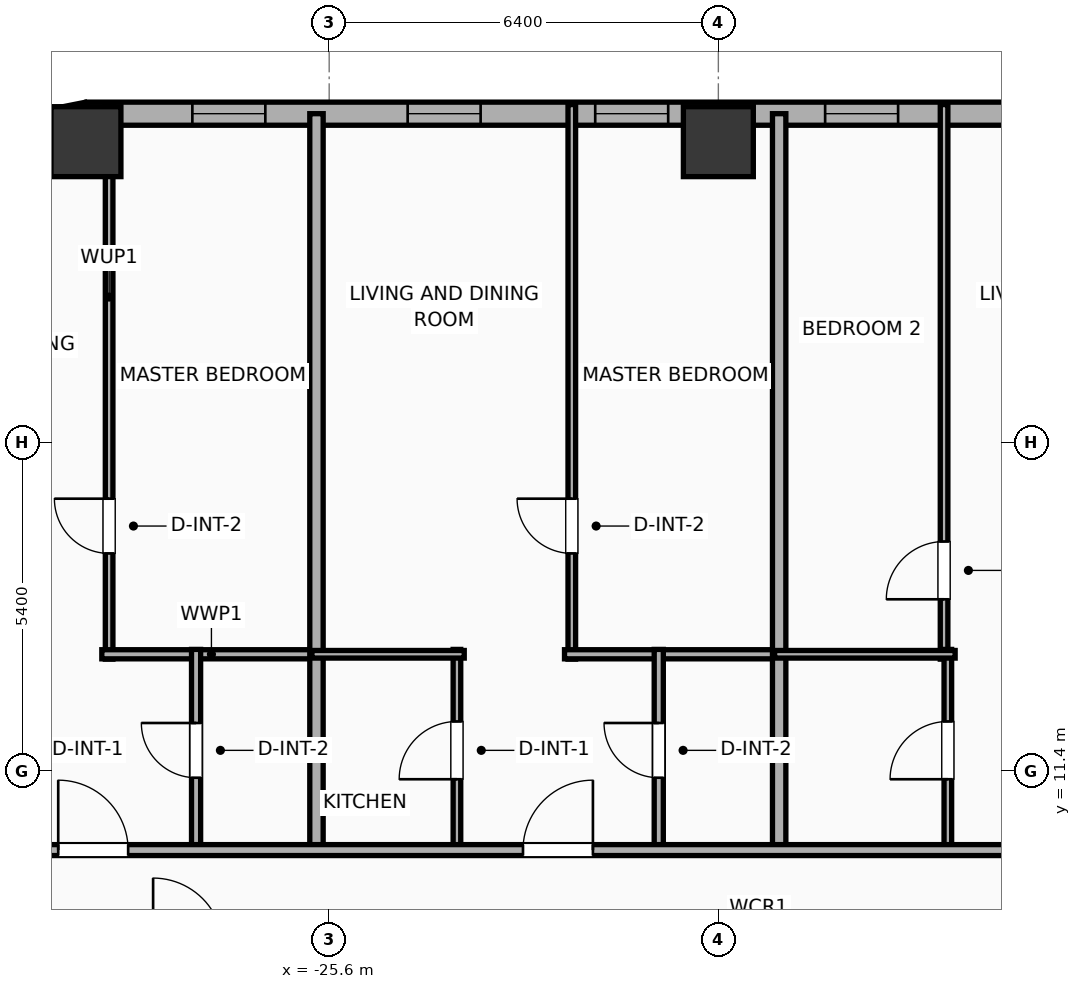
"""IFC4 building model, lengths in metres.
Left out: names, types, materials, properties, quantities, classifications, styles, units other than length and angle.
Written with IfcOpenShell. Run it as: python <this file> out.ifc"""

import sys

from ifc_helpers import new_model, si_unit, direction, frame, frame_2d, origin, origin_2d, place, context, subcontext, project, spatial, rectangle, hollow_rectangle, extrude, element, fill, save


model = new_model("IFC4")
c1 = context("Model", 3, precision=1e-05, world=origin(), true_north=direction((0.0, 1.0)))
c2 = subcontext(c1, "Body", "Model", "MODEL_VIEW")
j1 = project(units=[si_unit("LENGTHUNIT", "METRE"), si_unit("PLANEANGLEUNIT", "RADIAN")], contexts=[c1])
p1 = place(None, origin())
s1 = spatial("IfcSite", under=j1, at=p1, CompositionType="ELEMENT")
p2 = place(p1, origin())
s2 = spatial("IfcBuilding", under=s1, at=p2, CompositionType="ELEMENT")
p3 = place(p2, frame((0.0, 0.0, 45.5)))
s3 = spatial("IfcBuildingStorey", under=s2, at=p3, CompositionType="ELEMENT", Elevation=45.5)
for number, where, z_axis, x_axis in (
    (1, (-19.2, 21.75, 0.0), (0.0, 0.0, 1.0), (1.0, 0.0, 0.0)),
    (2, (-29.6, 21.75, 0.0), (0.0, 0.0, 1.0), (1.0, 0.0, 0.0)),
):
    element("IfcColumn", number, at=place(p3, frame(where, z_axis=z_axis, x_axis=x_axis)), inside=s3, PredefinedType="COLUMN", context=c2, shape_type="SweptSolid", body=[
        extrude(hollow_rectangle(XDim=1.15, YDim=1.15, WallThickness=0.04, at=origin_2d()), origin(), (0.0, 0.0, 1.0), 3.9),
    ])
p4 = place(p3, frame((-31.057, 21.917, 0.0), z_axis=(0.0, 0.0, 1.0), x_axis=(0.980786132421, 0.195086038585, 0.0)))
e3 = element("IfcWall", 3, at=p4, inside=s3, PredefinedType="ELEMENTEDWALL", context=c2, shape_type="SweptSolid", body=[
    extrude(rectangle(XDim=1.504, YDim=0.38, at=frame_2d((0.752, 0.0))), origin(), (0.0, 0.0, 1.0), 3.65),
])
p5 = place(p3, frame((-29.581, 22.21, 0.0), z_axis=(0.0, 0.0, 1.0), x_axis=(1.0, 0.0, 0.0)))
e4 = element("IfcWall", 4, at=p5, inside=s3, PredefinedType="ELEMENTEDWALL", context=c2, shape_type="SweptSolid", body=[
    extrude(rectangle(XDim=51.963, YDim=0.38, at=frame_2d((25.981, 0.0))), origin(), (0.0, 0.0, 1.0), 3.65),
])
p6 = place(p5, frame((25.631, 0.0, 0.75)))
e5 = element("IfcOpeningElement", 5, at=p6, cuts=e4, PredefinedType="OPENING", context=c2, shape_type="SweptSolid", body=[
    extrude(rectangle(XDim=2.4, YDim=2.1, at=frame_2d((1.2, 1.05))), frame((0.0, 0.2, 0.0), z_axis=(0.0, -1.0, 0.0), x_axis=(1.0, 0.0, 0.0)), (0.0, 0.0, 1.0), 0.4),
])
p7 = place(p5, frame((42.952, 0.0, 0.75)))
e6 = element("IfcOpeningElement", 6, at=p7, cuts=e4, PredefinedType="OPENING", context=c2, shape_type="SweptSolid", body=[
    extrude(rectangle(XDim=2.4, YDim=2.1, at=frame_2d((1.2, 1.05))), frame((0.0, 0.2, 0.0), z_axis=(0.0, -1.0, 0.0), x_axis=(1.0, 0.0, 0.0)), (0.0, 0.0, 1.0), 0.4),
])
p8 = place(p5, frame((1.731, 0.0, 0.75)))
e7 = element("IfcOpeningElement", 7, at=p8, cuts=e4, PredefinedType="OPENING", context=c2, shape_type="SweptSolid", body=[
    extrude(rectangle(XDim=1.2, YDim=2.05, at=frame_2d((0.6, 1.025))), frame((0.0, 0.2, 0.0), z_axis=(0.0, -1.0, 0.0), x_axis=(1.0, 0.0, 0.0)), (0.0, 0.0, 1.0), 0.4),
])
p9 = place(p5, frame((5.272, 0.0, 0.75)))
e8 = element("IfcOpeningElement", 8, at=p9, cuts=e4, PredefinedType="OPENING", context=c2, shape_type="SweptSolid", body=[
    extrude(rectangle(XDim=1.2, YDim=2.05, at=frame_2d((0.6, 1.025))), frame((0.0, 0.2, 0.0), z_axis=(0.0, -1.0, 0.0), x_axis=(1.0, 0.0, 0.0)), (0.0, 0.0, 1.0), 0.4),
])
p10 = place(p5, frame((8.356, 0.0, 0.75)))
e9 = element("IfcOpeningElement", 9, at=p10, cuts=e4, PredefinedType="OPENING", context=c2, shape_type="SweptSolid", body=[
    extrude(rectangle(XDim=1.2, YDim=2.05, at=frame_2d((0.6, 1.025))), frame((0.0, 0.2, 0.0), z_axis=(0.0, -1.0, 0.0), x_axis=(1.0, 0.0, 0.0)), (0.0, 0.0, 1.0), 0.4),
])
p11 = place(p5, frame((15.632, 0.0, 0.75)))
e10 = element("IfcOpeningElement", 10, at=p11, cuts=e4, PredefinedType="OPENING", context=c2, shape_type="SweptSolid", body=[
    extrude(rectangle(XDim=1.2, YDim=2.05, at=frame_2d((0.6, 1.025))), frame((0.0, 0.2, 0.0), z_axis=(0.0, -1.0, 0.0), x_axis=(1.0, 0.0, 0.0)), (0.0, 0.0, 1.0), 0.4),
])
p12 = place(p5, frame((12.137, 0.0, 0.75)))
e11 = element("IfcOpeningElement", 11, at=p12, cuts=e4, PredefinedType="OPENING", context=c2, shape_type="SweptSolid", body=[
    extrude(rectangle(XDim=1.2, YDim=2.05, at=frame_2d((0.6, 1.025))), frame((0.0, 0.2, 0.0), z_axis=(0.0, -1.0, 0.0), x_axis=(1.0, 0.0, 0.0)), (0.0, 0.0, 1.0), 0.4),
])
p13 = place(p5, frame((18.756, 0.0, 0.75)))
e12 = element("IfcOpeningElement", 12, at=p13, cuts=e4, PredefinedType="OPENING", context=c2, shape_type="SweptSolid", body=[
    extrude(rectangle(XDim=1.2, YDim=2.05, at=frame_2d((0.6, 1.025))), frame((0.0, 0.2, 0.0), z_axis=(0.0, -1.0, 0.0), x_axis=(1.0, 0.0, 0.0)), (0.0, 0.0, 1.0), 0.4),
])
p14 = place(p5, frame((22.907, 0.0, 0.75)))
e13 = element("IfcOpeningElement", 13, at=p14, cuts=e4, PredefinedType="OPENING", context=c2, shape_type="SweptSolid", body=[
    extrude(rectangle(XDim=1.2, YDim=2.05, at=frame_2d((0.6, 1.025))), frame((0.0, 0.2, 0.0), z_axis=(0.0, -1.0, 0.0), x_axis=(1.0, 0.0, 0.0)), (0.0, 0.0, 1.0), 0.4),
])
p15 = place(p5, frame((36.381, 0.0, 0.75)))
e14 = element("IfcOpeningElement", 14, at=p15, cuts=e4, PredefinedType="OPENING", context=c2, shape_type="SweptSolid", body=[
    extrude(rectangle(XDim=1.2, YDim=2.05, at=frame_2d((0.6, 1.025))), frame((0.0, 0.2, 0.0), z_axis=(0.0, -1.0, 0.0), x_axis=(1.0, 0.0, 0.0)), (0.0, 0.0, 1.0), 0.4),
])
p16 = place(p5, frame((32.886, 0.0, 0.75)))
e15 = element("IfcOpeningElement", 15, at=p16, cuts=e4, PredefinedType="OPENING", context=c2, shape_type="SweptSolid", body=[
    extrude(rectangle(XDim=1.2, YDim=2.05, at=frame_2d((0.6, 1.025))), frame((0.0, 0.2, 0.0), z_axis=(0.0, -1.0, 0.0), x_axis=(1.0, 0.0, 0.0)), (0.0, 0.0, 1.0), 0.4),
])
p17 = place(p5, frame((39.556, 0.0, 0.75)))
e16 = element("IfcOpeningElement", 16, at=p17, cuts=e4, PredefinedType="OPENING", context=c2, shape_type="SweptSolid", body=[
    extrude(rectangle(XDim=1.2, YDim=2.05, at=frame_2d((0.6, 1.025))), frame((0.0, 0.2, 0.0), z_axis=(0.0, -1.0, 0.0), x_axis=(1.0, 0.0, 0.0)), (0.0, 0.0, 1.0), 0.4),
])
p18 = place(p5, frame((46.885, 0.0, 0.75)))
e17 = element("IfcOpeningElement", 17, at=p18, cuts=e4, PredefinedType="OPENING", context=c2, shape_type="SweptSolid", body=[
    extrude(rectangle(XDim=1.2, YDim=2.05, at=frame_2d((0.6, 1.025))), frame((0.0, 0.2, 0.0), z_axis=(0.0, -1.0, 0.0), x_axis=(1.0, 0.0, 0.0)), (0.0, 0.0, 1.0), 0.4),
])
p19 = place(p5, frame((49.531, 0.0, 0.75)))
e18 = element("IfcOpeningElement", 18, at=p19, cuts=e4, PredefinedType="OPENING", context=c2, shape_type="SweptSolid", body=[
    extrude(rectangle(XDim=1.2, YDim=2.05, at=frame_2d((0.6, 1.025))), frame((0.0, 0.2, 0.0), z_axis=(0.0, -1.0, 0.0), x_axis=(1.0, 0.0, 0.0)), (0.0, 0.0, 1.0), 0.4),
])
p20 = place(p3, frame((-29.219, 13.24, 0.0), z_axis=(0.0, 0.0, 1.0), x_axis=(0.0, 1.0, 0.0)))
e19 = element("IfcWall", 19, at=p20, inside=s3, PredefinedType="PARTITIONING", context=c2, shape_type="SweptSolid", body=[
    extrude(rectangle(XDim=9.12, YDim=0.125, at=frame_2d((4.56, 0.0))), origin(), (0.0, 0.0, 1.0), 3.65),
])
p21 = place(p20, frame((1.739, 0.0, 0.0)))
e20 = element("IfcOpeningElement", 20, at=p21, cuts=e19, PredefinedType="OPENING", context=c2, shape_type="SweptSolid", body=[
    extrude(rectangle(XDim=0.9, YDim=2.05, at=frame_2d((0.45, 1.025))), frame((0.0, 0.073, 0.0), z_axis=(0.0, -1.0, 0.0), x_axis=(1.0, 0.0, 0.0)), (0.0, 0.0, 1.0), 0.145),
])
p22 = place(p3, frame((-29.339, 13.32, 0.0), z_axis=(0.0, 0.0, 1.0), x_axis=(1.0, 0.0, 0.0)))
e21 = element("IfcWall", 21, at=p22, inside=s3, PredefinedType="PLUMBINGWALL", context=c2, shape_type="SweptSolid", body=[
    extrude(rectangle(XDim=3.605, YDim=0.15, at=frame_2d((1.803, 0.0))), origin(), (0.0, 0.0, 1.0), 3.65),
])
p23 = place(p3, frame((-27.789, 10.08, 0.0), z_axis=(0.0, 0.0, 1.0), x_axis=(0.0, 1.0, 0.0)))
e22 = element("IfcWall", 22, at=p23, inside=s3, PredefinedType="PLUMBINGWALL", context=c2, shape_type="SweptSolid", body=[
    extrude(rectangle(XDim=3.32, YDim=0.15, at=frame_2d((1.66, 0.0))), origin(), (0.0, 0.0, 1.0), 3.65),
])
p24 = place(p23, frame((1.21, 0.0, 0.0)))
e23 = element("IfcOpeningElement", 23, at=p24, cuts=e22, PredefinedType="OPENING", context=c2, shape_type="SweptSolid", body=[
    extrude(rectangle(XDim=0.9, YDim=2.05, at=frame_2d((0.45, 1.025))), frame((0.0, 0.085, 0.0), z_axis=(0.0, -1.0, 0.0), x_axis=(1.0, 0.0, 0.0)), (0.0, 0.0, 1.0), 0.17),
])
p25 = place(p3, frame((-25.809, 10.02, 0.0), z_axis=(0.0, 0.0, 1.0), x_axis=(0.0, 1.0, 0.0)))
e24 = element("IfcWall", 24, at=p25, inside=s3, PredefinedType="PARTITIONING", context=c2, shape_type="SweptSolid", body=[
    extrude(rectangle(XDim=12.19, YDim=0.22, at=frame_2d((6.095, 0.0))), origin(), (0.0, 0.0, 1.0), 3.65),
])
p26 = place(p3, frame((-21.61, 13.24, 0.0), z_axis=(0.0, 0.0, 1.0), x_axis=(0.0, 1.0, 0.0)))
e25 = element("IfcWall", 25, at=p26, inside=s3, PredefinedType="PARTITIONING", context=c2, shape_type="SweptSolid", body=[
    extrude(rectangle(XDim=9.12, YDim=0.125, at=frame_2d((4.56, 0.0))), origin(), (0.0, 0.0, 1.0), 3.65),
])
p27 = place(p26, frame((1.739, 0.0, 0.0)))
e26 = element("IfcOpeningElement", 26, at=p27, cuts=e25, PredefinedType="OPENING", context=c2, shape_type="SweptSolid", body=[
    extrude(rectangle(XDim=0.9, YDim=2.05, at=frame_2d((0.45, 1.025))), frame((0.0, 0.073, 0.0), z_axis=(0.0, -1.0, 0.0), x_axis=(1.0, 0.0, 0.0)), (0.0, 0.0, 1.0), 0.145),
])
p28 = place(p3, frame((-21.73, 13.32, 0.0), z_axis=(0.0, 0.0, 1.0), x_axis=(1.0, 0.0, 0.0)))
e27 = element("IfcWall", 27, at=p28, inside=s3, PredefinedType="PLUMBINGWALL", context=c2, shape_type="SweptSolid", body=[
    extrude(rectangle(XDim=3.605, YDim=0.15, at=frame_2d((1.802, 0.0))), origin(), (0.0, 0.0, 1.0), 3.65),
])
p29 = place(p3, frame((-23.499, 10.08, 0.0), z_axis=(0.0, 0.0, 1.0), x_axis=(0.0, 1.0, 0.0)))
e28 = element("IfcWall", 28, at=p29, inside=s3, PredefinedType="PARTITIONING", context=c2, shape_type="SweptSolid", body=[
    extrude(rectangle(XDim=3.32, YDim=0.125, at=frame_2d((1.66, 0.0))), origin(), (0.0, 0.0, 1.0), 3.65),
])
p30 = place(p29, frame((1.185, 0.0, 0.0)))
e29 = element("IfcOpeningElement", 29, at=p30, cuts=e28, PredefinedType="OPENING", context=c2, shape_type="SweptSolid", body=[
    extrude(rectangle(XDim=0.95, YDim=2.05, at=frame_2d((0.475, 1.025))), frame((0.0, 0.073, 0.0), z_axis=(0.0, -1.0, 0.0), x_axis=(1.0, 0.0, 0.0)), (0.0, 0.0, 1.0), 0.145),
])
p31 = place(p3, frame((-25.884, 13.32, 0.0), z_axis=(0.0, 0.0, 1.0), x_axis=(1.0, 0.0, 0.0)))
e30 = element("IfcWall", 30, at=p31, inside=s3, PredefinedType="PARTITIONING", context=c2, shape_type="SweptSolid", body=[
    extrude(rectangle(XDim=2.505, YDim=0.125, at=frame_2d((1.252, 0.0))), origin(), (0.0, 0.0, 1.0), 3.65),
])
p32 = place(p3, frame((-20.18, 10.08, 0.0), z_axis=(0.0, 0.0, 1.0), x_axis=(0.0, 1.0, 0.0)))
e31 = element("IfcWall", 31, at=p32, inside=s3, PredefinedType="PLUMBINGWALL", context=c2, shape_type="SweptSolid", body=[
    extrude(rectangle(XDim=3.32, YDim=0.15, at=frame_2d((1.66, 0.0))), origin(), (0.0, 0.0, 1.0), 3.65),
])
p33 = place(p32, frame((1.21, 0.0, 0.0)))
e32 = element("IfcOpeningElement", 32, at=p33, cuts=e31, PredefinedType="OPENING", context=c2, shape_type="SweptSolid", body=[
    extrude(rectangle(XDim=0.9, YDim=2.05, at=frame_2d((0.45, 1.025))), frame((0.0, 0.085, 0.0), z_axis=(0.0, -1.0, 0.0), x_axis=(1.0, 0.0, 0.0)), (0.0, 0.0, 1.0), 0.17),
])
p34 = place(p3, frame((-18.2, 10.02, 0.0), z_axis=(0.0, 0.0, 1.0), x_axis=(0.0, 1.0, 0.0)))
e33 = element("IfcWall", 33, at=p34, inside=s3, PredefinedType="PARTITIONING", context=c2, shape_type="SweptSolid", body=[
    extrude(rectangle(XDim=12.19, YDim=0.22, at=frame_2d((6.095, 0.0))), origin(), (0.0, 0.0, 1.0), 3.65),
])
p35 = place(p3, frame((-15.488, 13.24, 0.0), z_axis=(0.0, 0.0, 1.0), x_axis=(0.0, 1.0, 0.0)))
e34 = element("IfcWall", 34, at=p35, inside=s3, PredefinedType="PARTITIONING", context=c2, shape_type="SweptSolid", body=[
    extrude(rectangle(XDim=9.12, YDim=0.125, at=frame_2d((4.56, 0.0))), origin(), (0.0, 0.0, 1.0), 3.65),
])
p36 = place(p35, frame((0.984, 0.0, 0.0)))
e35 = element("IfcOpeningElement", 35, at=p36, cuts=e34, PredefinedType="OPENING", context=c2, shape_type="SweptSolid", body=[
    extrude(rectangle(XDim=0.95, YDim=2.05, at=frame_2d((0.475, 1.025))), frame((0.0, 0.073, 0.0), z_axis=(0.0, -1.0, 0.0), x_axis=(1.0, 0.0, 0.0)), (0.0, 0.0, 1.0), 0.145),
])
p37 = place(p3, frame((-15.426, 10.08, 0.0), z_axis=(0.0, 0.0, 1.0), x_axis=(0.0, 1.0, 0.0)))
e36 = element("IfcWall", 36, at=p37, inside=s3, PredefinedType="PARTITIONING", context=c2, shape_type="SweptSolid", body=[
    extrude(rectangle(XDim=3.32, YDim=0.125, at=frame_2d((1.66, 0.0))), origin(), (0.0, 0.0, 1.0), 3.65),
])
p38 = place(p37, frame((1.185, 0.0, 0.0)))
e37 = element("IfcOpeningElement", 37, at=p38, cuts=e36, PredefinedType="OPENING", context=c2, shape_type="SweptSolid", body=[
    extrude(rectangle(XDim=0.95, YDim=2.05, at=frame_2d((0.475, 1.025))), frame((0.0, 0.073, 0.0), z_axis=(0.0, -1.0, 0.0), x_axis=(1.0, 0.0, 0.0)), (0.0, 0.0, 1.0), 0.145),
])
p39 = place(p3, frame((-18.275, 13.32, 0.0), z_axis=(0.0, 0.0, 1.0), x_axis=(1.0, 0.0, 0.0)))
e38 = element("IfcWall", 38, at=p39, inside=s3, PredefinedType="PARTITIONING", context=c2, shape_type="SweptSolid", body=[
    extrude(rectangle(XDim=2.969, YDim=0.125, at=frame_2d((1.484, 0.0))), origin(), (0.0, 0.0, 1.0), 3.65),
])
p40 = place(p3, frame((-33.41, 10.1, 0.0), z_axis=(0.0, 0.0, 1.0), x_axis=(1.0, 0.0, 0.0)))
e39 = element("IfcWall", 39, at=p40, inside=s3, PredefinedType="PARTITIONING", context=c2, shape_type="SweptSolid", body=[
    extrude(rectangle(XDim=59.62, YDim=0.18, at=frame_2d((29.81, 0.0))), origin(), (0.0, 0.0, 1.0), 3.65),
])
p41 = place(p40, frame((3.354, 0.0, 0.0)))
e40 = element("IfcOpeningElement", 40, at=p41, cuts=e39, PredefinedType="OPENING", context=c2, shape_type="SweptSolid", body=[
    extrude(rectangle(XDim=1.15, YDim=2.05, at=frame_2d((0.575, 1.025))), frame((0.0, 0.1, 0.0), z_axis=(0.0, -1.0, 0.0), x_axis=(1.0, 0.0, 0.0)), (0.0, 0.0, 1.0), 0.2),
])
p42 = place(p40, frame((10.997, 0.0, 0.0)))
e41 = element("IfcOpeningElement", 41, at=p42, cuts=e39, PredefinedType="OPENING", context=c2, shape_type="SweptSolid", body=[
    extrude(rectangle(XDim=1.15, YDim=2.05, at=frame_2d((0.575, 1.025))), frame((0.0, 0.1, 0.0), z_axis=(0.0, -1.0, 0.0), x_axis=(1.0, 0.0, 0.0)), (0.0, 0.0, 1.0), 0.2),
])
p43 = place(p40, frame((20.232, 0.0, 0.0)))
e42 = element("IfcOpeningElement", 42, at=p43, cuts=e39, PredefinedType="OPENING", context=c2, shape_type="SweptSolid", body=[
    extrude(rectangle(XDim=1.15, YDim=2.05, at=frame_2d((0.575, 1.025))), frame((0.0, 0.1, 0.0), z_axis=(0.0, -1.0, 0.0), x_axis=(1.0, 0.0, 0.0)), (0.0, 0.0, 1.0), 0.2),
])
p44 = place(p40, frame((30.38, 0.0, 0.0)))
e43 = element("IfcOpeningElement", 43, at=p44, cuts=e39, PredefinedType="OPENING", context=c2, shape_type="SweptSolid", body=[
    extrude(rectangle(XDim=1.15, YDim=2.05, at=frame_2d((0.575, 1.025))), frame((0.0, 0.1, 0.0), z_axis=(0.0, -1.0, 0.0), x_axis=(1.0, 0.0, 0.0)), (0.0, 0.0, 1.0), 0.2),
])
p45 = place(p40, frame((40.998, 0.0, 0.0)))
e44 = element("IfcOpeningElement", 44, at=p45, cuts=e39, PredefinedType="OPENING", context=c2, shape_type="SweptSolid", body=[
    extrude(rectangle(XDim=1.15, YDim=2.05, at=frame_2d((0.575, 1.025))), frame((0.0, 0.1, 0.0), z_axis=(0.0, -1.0, 0.0), x_axis=(1.0, 0.0, 0.0)), (0.0, 0.0, 1.0), 0.2),
])
p46 = place(p40, frame((49.428, 0.0, 0.0)))
e45 = element("IfcOpeningElement", 45, at=p46, cuts=e39, PredefinedType="OPENING", context=c2, shape_type="SweptSolid", body=[
    extrude(rectangle(XDim=0.9, YDim=2.05, at=frame_2d((0.45, 1.025))), frame((0.0, 0.1, 0.0), z_axis=(0.0, -1.0, 0.0), x_axis=(1.0, 0.0, 0.0)), (0.0, 0.0, 1.0), 0.2),
])
p47 = place(p40, frame((56.07, 0.0, 0.0)))
e46 = element("IfcOpeningElement", 46, at=p47, cuts=e39, PredefinedType="OPENING", context=c2, shape_type="SweptSolid", body=[
    extrude(rectangle(XDim=0.9, YDim=2.05, at=frame_2d((0.45, 1.025))), frame((0.0, 0.1, 0.0), z_axis=(0.0, -1.0, 0.0), x_axis=(1.0, 0.0, 0.0)), (0.0, 0.0, 1.0), 0.2),
])
p48 = place(p8, origin())
e47 = element("IfcWindow", 47, at=p48, inside=s3, PartitioningType="SINGLE_PANEL", PredefinedType="WINDOW", context=c2, shape_type="SweptSolid", body=[
    extrude(rectangle(XDim=1.2, YDim=2.05, at=frame_2d((0.6, 1.025))), frame((0.0, 0.03, 0.0), z_axis=(0.0, -1.0, 0.0), x_axis=(1.0, 0.0, 0.0)), (0.0, 0.0, 1.0), 0.06),
])
fill(e7, e47)
p49 = place(p9, origin())
e48 = element("IfcWindow", 48, at=p49, inside=s3, PartitioningType="SINGLE_PANEL", PredefinedType="WINDOW", context=c2, shape_type="SweptSolid", body=[
    extrude(rectangle(XDim=1.2, YDim=2.05, at=frame_2d((0.6, 1.025))), frame((0.0, 0.03, 0.0), z_axis=(0.0, -1.0, 0.0), x_axis=(1.0, 0.0, 0.0)), (0.0, 0.0, 1.0), 0.06),
])
fill(e8, e48)
p50 = place(p10, origin())
e49 = element("IfcWindow", 49, at=p50, inside=s3, PartitioningType="SINGLE_PANEL", PredefinedType="WINDOW", context=c2, shape_type="SweptSolid", body=[
    extrude(rectangle(XDim=1.2, YDim=2.05, at=frame_2d((0.6, 1.025))), frame((0.0, 0.03, 0.0), z_axis=(0.0, -1.0, 0.0), x_axis=(1.0, 0.0, 0.0)), (0.0, 0.0, 1.0), 0.06),
])
fill(e9, e49)
p51 = place(p12, origin())
e50 = element("IfcWindow", 50, at=p51, inside=s3, PartitioningType="SINGLE_PANEL", PredefinedType="WINDOW", context=c2, shape_type="SweptSolid", body=[
    extrude(rectangle(XDim=1.2, YDim=2.05, at=frame_2d((0.6, 1.025))), frame((0.0, 0.03, 0.0), z_axis=(0.0, -1.0, 0.0), x_axis=(1.0, 0.0, 0.0)), (0.0, 0.0, 1.0), 0.06),
])
fill(e11, e50)
p52 = place(p21, origin())
e51 = element("IfcDoor", 51, at=p52, inside=s3, OperationType="SINGLE_SWING_RIGHT", PredefinedType="DOOR", context=c2, shape_type="SweptSolid", body=[
    extrude(rectangle(XDim=0.9, YDim=2.05, at=frame_2d((0.45, 1.025))), frame((0.0, 0.025, 0.0), z_axis=(0.0, -1.0, 0.0), x_axis=(1.0, 0.0, 0.0)), (0.0, 0.0, 1.0), 0.05),
])
fill(e20, e51)
p53 = place(p24, origin())
e52 = element("IfcDoor", 52, at=p53, inside=s3, OperationType="SINGLE_SWING_RIGHT", PredefinedType="DOOR", context=c2, shape_type="SweptSolid", body=[
    extrude(rectangle(XDim=0.9, YDim=2.05, at=frame_2d((0.45, 1.025))), frame((0.0, 0.025, 0.0), z_axis=(0.0, -1.0, 0.0), x_axis=(1.0, 0.0, 0.0)), (0.0, 0.0, 1.0), 0.05),
])
fill(e23, e52)
p54 = place(p27, origin())
e53 = element("IfcDoor", 53, at=p54, inside=s3, OperationType="SINGLE_SWING_RIGHT", PredefinedType="DOOR", context=c2, shape_type="SweptSolid", body=[
    extrude(rectangle(XDim=0.9, YDim=2.05, at=frame_2d((0.45, 1.025))), frame((0.0, 0.025, 0.0), z_axis=(0.0, -1.0, 0.0), x_axis=(1.0, 0.0, 0.0)), (0.0, 0.0, 1.0), 0.05),
])
fill(e26, e53)
p55 = place(p30, origin())
e54 = element("IfcDoor", 54, at=p55, inside=s3, OperationType="SINGLE_SWING_LEFT", PredefinedType="DOOR", context=c2, shape_type="SweptSolid", body=[
    extrude(rectangle(XDim=0.95, YDim=2.05, at=frame_2d((0.475, 1.025))), frame((0.0, 0.025, 0.0), z_axis=(0.0, -1.0, 0.0), x_axis=(1.0, 0.0, 0.0)), (0.0, 0.0, 1.0), 0.05),
])
fill(e29, e54)
p56 = place(p33, origin())
e55 = element("IfcDoor", 55, at=p56, inside=s3, OperationType="SINGLE_SWING_RIGHT", PredefinedType="DOOR", context=c2, shape_type="SweptSolid", body=[
    extrude(rectangle(XDim=0.9, YDim=2.05, at=frame_2d((0.45, 1.025))), frame((0.0, 0.025, 0.0), z_axis=(0.0, -1.0, 0.0), x_axis=(1.0, 0.0, 0.0)), (0.0, 0.0, 1.0), 0.05),
])
fill(e32, e55)
p57 = place(p36, origin())
e56 = element("IfcDoor", 56, at=p57, inside=s3, OperationType="SINGLE_SWING_LEFT", PredefinedType="DOOR", context=c2, shape_type="SweptSolid", body=[
    extrude(rectangle(XDim=0.95, YDim=2.05, at=frame_2d((0.475, 1.025))), frame((0.0, 0.025, 0.0), z_axis=(0.0, -1.0, 0.0), x_axis=(1.0, 0.0, 0.0)), (0.0, 0.0, 1.0), 0.05),
])
fill(e35, e56)
p58 = place(p38, origin())
e57 = element("IfcDoor", 57, at=p58, inside=s3, OperationType="SINGLE_SWING_LEFT", PredefinedType="DOOR", context=c2, shape_type="SweptSolid", body=[
    extrude(rectangle(XDim=0.95, YDim=2.05, at=frame_2d((0.475, 1.025))), frame((0.0, 0.025, 0.0), z_axis=(0.0, -1.0, 0.0), x_axis=(1.0, 0.0, 0.0)), (0.0, 0.0, 1.0), 0.05),
])
fill(e37, e57)
p59 = place(p41, origin())
e58 = element("IfcDoor", 58, at=p59, inside=s3, OperationType="SINGLE_SWING_LEFT", PredefinedType="DOOR", context=c2, shape_type="SweptSolid", body=[
    extrude(rectangle(XDim=1.15, YDim=2.05, at=frame_2d((0.575, 1.025))), frame((0.0, 0.025, 0.0), z_axis=(0.0, -1.0, 0.0), x_axis=(1.0, 0.0, 0.0)), (0.0, 0.0, 1.0), 0.05),
])
fill(e40, e58)
p60 = place(p42, origin())
e59 = element("IfcDoor", 59, at=p60, inside=s3, OperationType="SINGLE_SWING_RIGHT", PredefinedType="DOOR", context=c2, shape_type="SweptSolid", body=[
    extrude(rectangle(XDim=1.15, YDim=2.05, at=frame_2d((0.575, 1.025))), frame((0.0, 0.025, 0.0), z_axis=(0.0, -1.0, 0.0), x_axis=(1.0, 0.0, 0.0)), (0.0, 0.0, 1.0), 0.05),
])
fill(e41, e59)
save(model, sys.argv[1])
